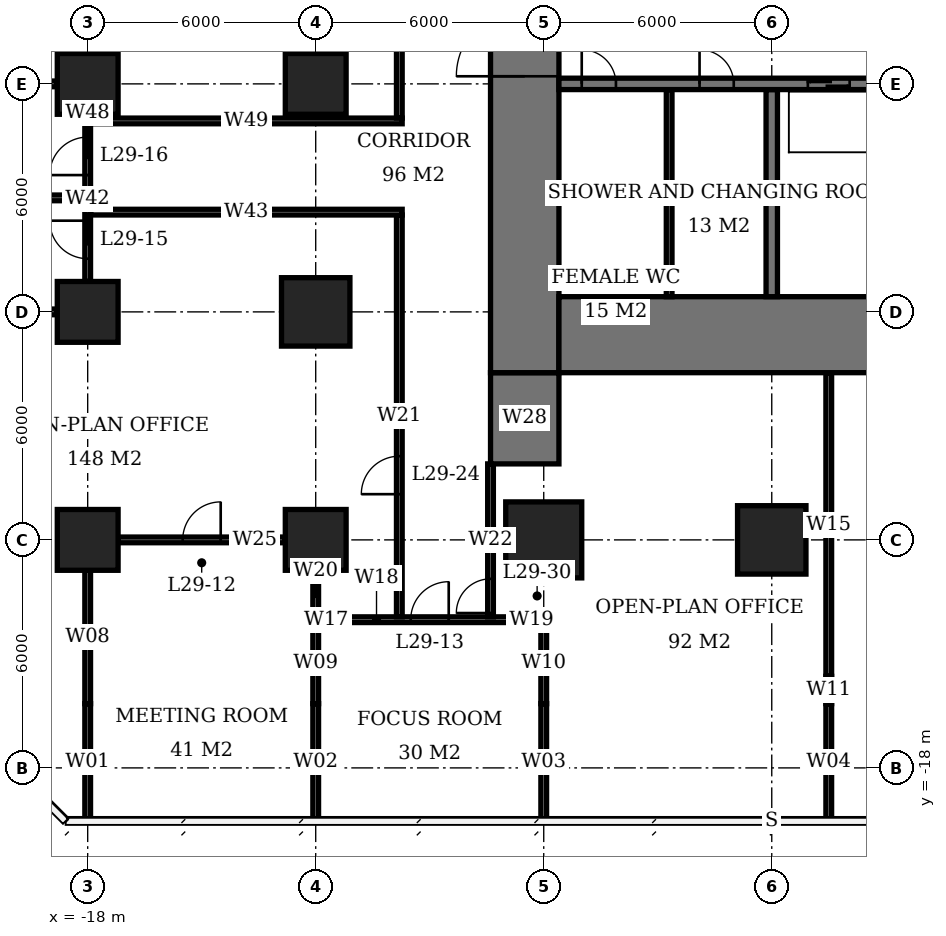
"""IFC4 building model, lengths in metres.
Left out: names, types, materials, properties, quantities, classifications, styles, units other than length and angle.
Written with IfcOpenShell. Run it as: python <this file> out.ifc"""

import sys

from ifc_helpers import new_model, si_unit, direction, frame, frame_2d, origin, origin_2d, place, context, subcontext, project, spatial, rectangle, extrude, element, fill, save


model = new_model("IFC4")
c1 = context("Model", 3, precision=1e-05, world=origin(), true_north=direction((0.0, 1.0)))
c2 = subcontext(c1, "Body", "Model", "MODEL_VIEW")
j1 = project(units=[si_unit("LENGTHUNIT", "METRE"), si_unit("PLANEANGLEUNIT", "RADIAN")], contexts=[c1])
p1 = place(None, origin())
s1 = spatial("IfcSite", under=j1, at=p1, CompositionType="ELEMENT")
p2 = place(p1, origin())
s2 = spatial("IfcBuilding", under=s1, at=p2, CompositionType="ELEMENT")
p3 = place(p2, frame((0.0, 0.0, 121.1)))
s3 = spatial("IfcBuildingStorey", under=s2, at=p3, CompositionType="ELEMENT", Elevation=121.1)
for number, where, z_axis, x_axis in (
    (1, (-18.0, -12.0, 0.0), (0.0, 0.0, 1.0), (1.0, 0.0, 0.0)),
    (2, (-18.0, -6.0, 0.0), (0.0, 0.0, 1.0), (1.0, 0.0, 0.0)),
    (3, (-18.0, 0.0, 0.0), (0.0, 0.0, 1.0), (1.0, 0.0, 0.0)),
    (4, (-12.0, -12.0, 0.0), (0.0, 0.0, 1.0), (1.0, 0.0, 0.0)),
):
    element("IfcColumn", number, at=place(p3, frame(where, z_axis=z_axis, x_axis=x_axis)), inside=s3, PredefinedType="COLUMN", context=c2, shape_type="SweptSolid", body=[
        extrude(rectangle(XDim=1.6, YDim=1.6, at=origin_2d()), origin(), (0.0, 0.0, 1.0), 3.9),
    ])
p4 = place(p3, frame((-12.0, -6.0, 0.0), z_axis=(0.0, 0.0, 1.0), x_axis=(1.0, 0.0, 0.0)))
e5 = element("IfcColumn", 5, at=p4, inside=s3, PredefinedType="COLUMN", context=c2, shape_type="SweptSolid", body=[
    extrude(rectangle(XDim=1.8, YDim=1.8, at=origin_2d()), origin(), (0.0, 0.0, 1.0), 3.9),
])
p5 = place(p3, frame((-12.0, 0.0, 0.0), z_axis=(0.0, 0.0, 1.0), x_axis=(1.0, 0.0, 0.0)))
e6 = element("IfcColumn", 6, at=p5, inside=s3, PredefinedType="COLUMN", context=c2, shape_type="SweptSolid", body=[
    extrude(rectangle(XDim=1.6, YDim=1.6, at=origin_2d()), origin(), (0.0, 0.0, 1.0), 3.9),
])
p6 = place(p3, frame((-6.0, -12.0, 0.0), z_axis=(0.0, 0.0, 1.0), x_axis=(1.0, 0.0, 0.0)))
e7 = element("IfcColumn", 7, at=p6, inside=s3, PredefinedType="COLUMN", context=c2, shape_type="SweptSolid", body=[
    extrude(rectangle(XDim=2.0, YDim=2.0, at=origin_2d()), origin(), (0.0, 0.0, 1.0), 3.9),
])
p7 = place(p3, frame((0.0, -12.0, 0.0), z_axis=(0.0, 0.0, 1.0), x_axis=(1.0, 0.0, 0.0)))
e8 = element("IfcColumn", 8, at=p7, inside=s3, PredefinedType="COLUMN", context=c2, shape_type="SweptSolid", body=[
    extrude(rectangle(XDim=1.8, YDim=1.8, at=origin_2d()), origin(), (0.0, 0.0, 1.0), 3.9),
])
p8 = place(p3, frame((-5.6, -6.6, 0.0), z_axis=(0.0, 0.0, 1.0), x_axis=(1.0, 0.0, 0.0)))
e9 = element("IfcWall", 9, at=p8, inside=s3, PredefinedType="SHEAR", context=c2, shape_type="SweptSolid", body=[
    extrude(rectangle(XDim=23.2, YDim=2.0, at=frame_2d((11.6, 0.0))), origin(), (0.0, 0.0, 1.0), 3.9),
])
p9 = place(p3, frame((-6.5, -7.6, 0.0), z_axis=(0.0, 0.0, 1.0), x_axis=(0.0, 1.0, 0.0)))
e10 = element("IfcWall", 10, at=p9, inside=s3, PredefinedType="SHEAR", context=c2, shape_type="SweptSolid", body=[
    extrude(rectangle(XDim=21.2, YDim=1.8, at=frame_2d((10.6, 0.0))), origin(), (0.0, 0.0, 1.0), 3.9),
])
p10 = place(p9, frame((7.8, 0.0, 0.0)))
e11 = element("IfcOpeningElement", 11, at=p10, cuts=e10, PredefinedType="OPENING", context=c2, shape_type="SweptSolid", body=[
    extrude(rectangle(XDim=1.8, YDim=2.4, at=frame_2d((0.9, 1.2))), frame((0.0, 0.91, 0.0), z_axis=(0.0, -1.0, 0.0), x_axis=(1.0, 0.0, 0.0)), (0.0, 0.0, 1.0), 1.82),
])
p11 = place(p3, frame((-6.5, -10.0, 0.0), z_axis=(0.0, 0.0, 1.0), x_axis=(0.0, 1.0, 0.0)))
e12 = element("IfcWall", 12, at=p11, inside=s3, PredefinedType="SHEAR", context=c2, shape_type="SweptSolid", body=[
    extrude(rectangle(XDim=2.4, YDim=1.8, at=frame_2d((1.2, 0.0))), origin(), (0.0, 0.0, 1.0), 3.9),
])
p12 = place(p3, frame((-5.6, 0.0, 0.0), z_axis=(0.0, 0.0, 1.0), x_axis=(1.0, 0.0, 0.0)))
e13 = element("IfcWall", 13, at=p12, inside=s3, PredefinedType="SHEAR", context=c2, shape_type="SweptSolid", body=[
    extrude(rectangle(XDim=17.75, YDim=0.3, at=frame_2d((8.875, 0.0))), origin(), (0.0, 0.0, 1.0), 3.9),
])
p13 = place(p12, frame((0.6, 0.0, 0.0)))
e14 = element("IfcOpeningElement", 14, at=p13, cuts=e13, PredefinedType="OPENING", context=c2, shape_type="SweptSolid", body=[
    extrude(rectangle(XDim=0.9, YDim=2.1, at=frame_2d((0.45, 1.05))), frame((0.0, 0.16, 0.0), z_axis=(0.0, -1.0, 0.0), x_axis=(1.0, 0.0, 0.0)), (0.0, 0.0, 1.0), 0.32),
])
p14 = place(p12, frame((3.7, 0.0, 0.0)))
e15 = element("IfcOpeningElement", 15, at=p14, cuts=e13, PredefinedType="OPENING", context=c2, shape_type="SweptSolid", body=[
    extrude(rectangle(XDim=0.9, YDim=2.1, at=frame_2d((0.45, 1.05))), frame((0.0, 0.16, 0.0), z_axis=(0.0, -1.0, 0.0), x_axis=(1.0, 0.0, 0.0)), (0.0, 0.0, 1.0), 0.32),
])
p15 = place(p12, frame((6.55, 0.0, 0.0)))
e16 = element("IfcOpeningElement", 16, at=p15, cuts=e13, PredefinedType="OPENING", context=c2, shape_type="SweptSolid", body=[
    extrude(rectangle(XDim=1.1, YDim=2.1, at=frame_2d((0.55, 1.05))), frame((0.0, 0.16, 0.0), z_axis=(0.0, -1.0, 0.0), x_axis=(1.0, 0.0, 0.0)), (0.0, 0.0, 1.0), 0.32),
])
p16 = place(p12, frame((9.55, 0.0, 0.0)))
e17 = element("IfcOpeningElement", 17, at=p16, cuts=e13, PredefinedType="OPENING", context=c2, shape_type="SweptSolid", body=[
    extrude(rectangle(XDim=1.1, YDim=2.1, at=frame_2d((0.55, 1.05))), frame((0.0, 0.16, 0.0), z_axis=(0.0, -1.0, 0.0), x_axis=(1.0, 0.0, 0.0)), (0.0, 0.0, 1.0), 0.32),
])
p17 = place(p3, frame((0.0, -5.6, 0.0), z_axis=(0.0, 0.0, 1.0), x_axis=(0.0, 1.0, 0.0)))
e18 = element("IfcWall", 18, at=p17, inside=s3, PredefinedType="SHEAR", context=c2, shape_type="SweptSolid", body=[
    extrude(rectangle(XDim=5.45, YDim=0.3, at=frame_2d((2.725, 0.0))), origin(), (0.0, 0.0, 1.0), 3.9),
])
p18 = place(p3, frame((-2.7, -5.6, 0.0), z_axis=(0.0, 0.0, 1.0), x_axis=(0.0, 1.0, 0.0)))
e19 = element("IfcWall", 19, at=p18, inside=s3, PredefinedType="PLUMBINGWALL", context=c2, shape_type="SweptSolid", body=[
    extrude(rectangle(XDim=5.45, YDim=0.15, at=frame_2d((2.725, 0.0))), origin(), (0.0, 0.0, 1.0), 3.65),
])
p19 = place(p3, frame((-12.15, -14.1, 0.0), z_axis=(0.0, 0.0, 1.0), x_axis=(1.0, 0.0, 0.0)))
e20 = element("IfcWall", 20, at=p19, inside=s3, PredefinedType="PARTITIONING", context=c2, shape_type="SweptSolid", body=[
    extrude(rectangle(XDim=0.86, YDim=0.15, at=frame_2d((0.43, 0.0))), origin(), (0.0, 0.0, 1.0), 2.65),
])
p20 = place(p3, frame((-11.29, -14.1, 0.0), z_axis=(0.0, 0.0, 1.0), x_axis=(1.0, 0.0, 0.0)))
e21 = element("IfcWall", 21, at=p20, inside=s3, PredefinedType="PARTITIONING", context=c2, shape_type="SweptSolid", body=[
    extrude(rectangle(XDim=4.58, YDim=0.15, at=frame_2d((2.29, 0.0))), origin(), (0.0, 0.0, 1.0), 3.65),
])
p21 = place(p20, frame((1.79, 0.0, 0.0)))
e22 = element("IfcOpeningElement", 22, at=p21, cuts=e21, PredefinedType="OPENING", context=c2, shape_type="SweptSolid", body=[
    extrude(rectangle(XDim=1.0, YDim=2.1, at=frame_2d((0.5, 1.05))), frame((0.0, 0.085, 0.0), z_axis=(0.0, -1.0, 0.0), x_axis=(1.0, 0.0, 0.0)), (0.0, 0.0, 1.0), 0.17),
])
p22 = place(p3, frame((-6.71, -14.1, 0.0), z_axis=(0.0, 0.0, 1.0), x_axis=(1.0, 0.0, 0.0)))
e23 = element("IfcWall", 23, at=p22, inside=s3, PredefinedType="PARTITIONING", context=c2, shape_type="SweptSolid", body=[
    extrude(rectangle(XDim=0.785, YDim=0.15, at=frame_2d((0.393, 0.0))), origin(), (0.0, 0.0, 1.0), 2.65),
])
p23 = place(p3, frame((-17.2, -12.0, 0.0), z_axis=(0.0, 0.0, 1.0), x_axis=(1.0, 0.0, 0.0)))
e24 = element("IfcWall", 24, at=p23, inside=s3, PredefinedType="PARTITIONING", context=c2, shape_type="SweptSolid", body=[
    extrude(rectangle(XDim=4.4, YDim=0.15, at=frame_2d((2.2, 0.0))), origin(), (0.0, 0.0, 1.0), 3.65),
])
p24 = place(p23, frame((1.7, 0.0, 0.0)))
e25 = element("IfcOpeningElement", 25, at=p24, cuts=e24, PredefinedType="OPENING", context=c2, shape_type="SweptSolid", body=[
    extrude(rectangle(XDim=1.0, YDim=2.1, at=frame_2d((0.5, 1.05))), frame((0.0, 0.085, 0.0), z_axis=(0.0, -1.0, 0.0), x_axis=(1.0, 0.0, 0.0)), (0.0, 0.0, 1.0), 0.17),
])
p25 = place(p3, frame((-22.31, -6.0, 0.0), z_axis=(0.0, 0.0, 1.0), x_axis=(1.0, 0.0, 0.0)))
e26 = element("IfcWall", 26, at=p25, inside=s3, PredefinedType="PARTITIONING", context=c2, shape_type="SweptSolid", body=[
    extrude(rectangle(XDim=3.51, YDim=0.15, at=frame_2d((1.755, 0.0))), origin(), (0.0, 0.0, 1.0), 2.65),
])
p26 = place(p3, frame((-21.59, -3.0, 0.0), z_axis=(0.0, 0.0, 1.0), x_axis=(1.0, 0.0, 0.0)))
e27 = element("IfcWall", 27, at=p26, inside=s3, PredefinedType="PARTITIONING", context=c2, shape_type="SweptSolid", body=[
    extrude(rectangle(XDim=3.74, YDim=0.15, at=frame_2d((1.87, 0.0))), origin(), (0.0, 0.0, 1.0), 3.65),
])
p27 = place(p3, frame((-22.31, 0.0, 0.0), z_axis=(0.0, 0.0, 1.0), x_axis=(1.0, 0.0, 0.0)))
e28 = element("IfcWall", 28, at=p27, inside=s3, PredefinedType="PARTITIONING", context=c2, shape_type="SweptSolid", body=[
    extrude(rectangle(XDim=3.51, YDim=0.15, at=frame_2d((1.755, 0.0))), origin(), (0.0, 0.0, 1.0), 2.65),
])
p28 = place(p3, frame((-18.0, -19.4, 0.0), z_axis=(0.0, 0.0, 1.0), x_axis=(0.0, 1.0, 0.0)))
e29 = element("IfcWall", 29, at=p28, inside=s3, PredefinedType="PARTITIONING", context=c2, shape_type="SweptSolid", body=[
    extrude(rectangle(XDim=3.09, YDim=0.15, at=frame_2d((1.545, 0.0))), origin(), (0.0, 0.0, 1.0), 3.65),
])
p29 = place(p3, frame((-18.0, -16.31, 0.0), z_axis=(0.0, 0.0, 1.0), x_axis=(0.0, 1.0, 0.0)))
e30 = element("IfcWall", 30, at=p29, inside=s3, PredefinedType="PARTITIONING", context=c2, shape_type="SweptSolid", body=[
    extrude(rectangle(XDim=3.51, YDim=0.15, at=frame_2d((1.755, 0.0))), origin(), (0.0, 0.0, 1.0), 2.65),
])
p30 = place(p3, frame((-18.0, -5.2, 0.0), z_axis=(0.0, 0.0, 1.0), x_axis=(0.0, 1.0, 0.0)))
e31 = element("IfcWall", 31, at=p30, inside=s3, PredefinedType="PARTITIONING", context=c2, shape_type="SweptSolid", body=[
    extrude(rectangle(XDim=2.125, YDim=0.15, at=frame_2d((1.062, 0.0))), origin(), (0.0, 0.0, 1.0), 3.65),
])
p31 = place(p30, frame((0.6, 0.0, 0.0)))
e32 = element("IfcOpeningElement", 32, at=p31, cuts=e31, PredefinedType="OPENING", context=c2, shape_type="SweptSolid", body=[
    extrude(rectangle(XDim=1.0, YDim=2.1, at=frame_2d((0.5, 1.05))), frame((0.0, 0.085, 0.0), z_axis=(0.0, -1.0, 0.0), x_axis=(1.0, 0.0, 0.0)), (0.0, 0.0, 1.0), 0.17),
])
p32 = place(p3, frame((-18.0, -2.925, 0.0), z_axis=(0.0, 0.0, 1.0), x_axis=(0.0, 1.0, 0.0)))
e33 = element("IfcWall", 33, at=p32, inside=s3, PredefinedType="PARTITIONING", context=c2, shape_type="SweptSolid", body=[
    extrude(rectangle(XDim=2.125, YDim=0.15, at=frame_2d((1.062, 0.0))), origin(), (0.0, 0.0, 1.0), 3.65),
])
p33 = place(p32, frame((0.525, 0.0, 0.0)))
e34 = element("IfcOpeningElement", 34, at=p33, cuts=e33, PredefinedType="OPENING", context=c2, shape_type="SweptSolid", body=[
    extrude(rectangle(XDim=1.0, YDim=2.1, at=frame_2d((0.5, 1.05))), frame((0.0, 0.085, 0.0), z_axis=(0.0, -1.0, 0.0), x_axis=(1.0, 0.0, 0.0)), (0.0, 0.0, 1.0), 0.17),
])
p34 = place(p3, frame((-18.0, 0.8, 0.0), z_axis=(0.0, 0.0, 1.0), x_axis=(0.0, 1.0, 0.0)))
e35 = element("IfcWall", 35, at=p34, inside=s3, PredefinedType="PARTITIONING", context=c2, shape_type="SweptSolid", body=[
    extrude(rectangle(XDim=4.4, YDim=0.15, at=frame_2d((2.2, 0.0))), origin(), (0.0, 0.0, 1.0), 3.65),
])
p35 = place(p34, frame((1.7, 0.0, 0.0)))
e36 = element("IfcOpeningElement", 36, at=p35, cuts=e35, PredefinedType="OPENING", context=c2, shape_type="SweptSolid", body=[
    extrude(rectangle(XDim=1.0, YDim=2.1, at=frame_2d((0.5, 1.05))), frame((0.0, 0.085, 0.0), z_axis=(0.0, -1.0, 0.0), x_axis=(1.0, 0.0, 0.0)), (0.0, 0.0, 1.0), 0.17),
])
p36 = place(p3, frame((-12.0, -19.4, 0.0), z_axis=(0.0, 0.0, 1.0), x_axis=(0.0, 1.0, 0.0)))
e37 = element("IfcWall", 37, at=p36, inside=s3, PredefinedType="PARTITIONING", context=c2, shape_type="SweptSolid", body=[
    extrude(rectangle(XDim=3.09, YDim=0.15, at=frame_2d((1.545, 0.0))), origin(), (0.0, 0.0, 1.0), 3.65),
])
p37 = place(p3, frame((-12.0, -16.31, 0.0), z_axis=(0.0, 0.0, 1.0), x_axis=(0.0, 1.0, 0.0)))
e38 = element("IfcWall", 38, at=p37, inside=s3, PredefinedType="PARTITIONING", context=c2, shape_type="SweptSolid", body=[
    extrude(rectangle(XDim=2.135, YDim=0.15, at=frame_2d((1.067, 0.0))), origin(), (0.0, 0.0, 1.0), 2.65),
])
p38 = place(p3, frame((-12.0, -14.025, 0.0), z_axis=(0.0, 0.0, 1.0), x_axis=(0.0, 1.0, 0.0)))
e39 = element("IfcWall", 39, at=p38, inside=s3, PredefinedType="PARTITIONING", context=c2, shape_type="SweptSolid", body=[
    extrude(rectangle(XDim=1.225, YDim=0.15, at=frame_2d((0.612, 0.0))), origin(), (0.0, 0.0, 1.0), 2.65),
])
p39 = place(p3, frame((-6.0, -19.4, 0.0), z_axis=(0.0, 0.0, 1.0), x_axis=(0.0, 1.0, 0.0)))
e40 = element("IfcWall", 40, at=p39, inside=s3, PredefinedType="PARTITIONING", context=c2, shape_type="SweptSolid", body=[
    extrude(rectangle(XDim=3.09, YDim=0.15, at=frame_2d((1.545, 0.0))), origin(), (0.0, 0.0, 1.0), 3.65),
])
p40 = place(p3, frame((-6.0, -16.31, 0.0), z_axis=(0.0, 0.0, 1.0), x_axis=(0.0, 1.0, 0.0)))
e41 = element("IfcWall", 41, at=p40, inside=s3, PredefinedType="PARTITIONING", context=c2, shape_type="SweptSolid", body=[
    extrude(rectangle(XDim=2.135, YDim=0.15, at=frame_2d((1.067, 0.0))), origin(), (0.0, 0.0, 1.0), 2.65),
])
for number, where, z_axis, x_axis in (
    (42, (-17.925, -3.375, 0.0), (0.0, 0.0, 1.0), (1.0, 0.0, 0.0)),
    (43, (-17.925, -0.975, 0.0), (0.0, 0.0, 1.0), (1.0, 0.0, 0.0)),
):
    element("IfcWall", number, at=place(p3, frame(where, z_axis=z_axis, x_axis=x_axis)), inside=s3, PredefinedType="PARTITIONING", context=c2, shape_type="SweptSolid", body=[
        extrude(rectangle(XDim=8.2, YDim=0.15, at=frame_2d((4.1, 0.0))), origin(), (0.0, 0.0, 1.0), 3.65),
    ])
p41 = place(p3, frame((-9.8, -14.025, 0.0), z_axis=(0.0, 0.0, 1.0), x_axis=(0.0, 1.0, 0.0)))
e44 = element("IfcWall", 44, at=p41, inside=s3, PredefinedType="PARTITIONING", context=c2, shape_type="SweptSolid", body=[
    extrude(rectangle(XDim=10.575, YDim=0.15, at=frame_2d((5.288, 0.0))), origin(), (0.0, 0.0, 1.0), 3.65),
])
p42 = place(p41, frame((3.228, 0.0, 0.0)))
e45 = element("IfcOpeningElement", 45, at=p42, cuts=e44, PredefinedType="OPENING", context=c2, shape_type="SweptSolid", body=[
    extrude(rectangle(XDim=1.0, YDim=2.1, at=frame_2d((0.5, 1.05))), frame((0.0, 0.085, 0.0), z_axis=(0.0, -1.0, 0.0), x_axis=(1.0, 0.0, 0.0)), (0.0, 0.0, 1.0), 0.17),
])
p43 = place(p3, frame((-9.8, -0.9, 0.0), z_axis=(0.0, 0.0, 1.0), x_axis=(0.0, 1.0, 0.0)))
e46 = element("IfcWall", 46, at=p43, inside=s3, PredefinedType="PARTITIONING", context=c2, shape_type="SweptSolid", body=[
    extrude(rectangle(XDim=11.325, YDim=0.15, at=frame_2d((5.663, 0.0))), origin(), (0.0, 0.0, 1.0), 3.65),
])
p44 = place(p43, frame((3.441, 0.0, 0.0)))
e47 = element("IfcOpeningElement", 47, at=p44, cuts=e46, PredefinedType="OPENING", context=c2, shape_type="SweptSolid", body=[
    extrude(rectangle(XDim=1.0, YDim=2.1, at=frame_2d((0.5, 1.05))), frame((0.0, 0.085, 0.0), z_axis=(0.0, -1.0, 0.0), x_axis=(1.0, 0.0, 0.0)), (0.0, 0.0, 1.0), 0.17),
])
p45 = place(p3, frame((-7.4, -14.025, 0.0), z_axis=(0.0, 0.0, 1.0), x_axis=(0.0, 1.0, 0.0)))
e48 = element("IfcWall", 48, at=p45, inside=s3, PredefinedType="PARTITIONING", context=c2, shape_type="SweptSolid", body=[
    extrude(rectangle(XDim=4.025, YDim=0.15, at=frame_2d((2.012, 0.0))), origin(), (0.0, 0.0, 1.0), 3.65),
])
p46 = place(p45, frame((0.1, 0.0, 0.0)))
e49 = element("IfcOpeningElement", 49, at=p46, cuts=e48, PredefinedType="OPENING", context=c2, shape_type="SweptSolid", body=[
    extrude(rectangle(XDim=0.9, YDim=2.1, at=frame_2d((0.45, 1.05))), frame((0.0, 0.085, 0.0), z_axis=(0.0, -1.0, 0.0), x_axis=(1.0, 0.0, 0.0)), (0.0, 0.0, 1.0), 0.17),
])
p47 = place(p3, frame((1.5, -19.4, 0.0), z_axis=(0.0, 0.0, 1.0), x_axis=(0.0, 1.0, 0.0)))
e50 = element("IfcWall", 50, at=p47, inside=s3, PredefinedType="PARTITIONING", context=c2, shape_type="SweptSolid", body=[
    extrude(rectangle(XDim=3.09, YDim=0.15, at=frame_2d((1.545, 0.0))), origin(), (0.0, 0.0, 1.0), 3.65),
])
p48 = place(p3, frame((1.5, -16.31, 0.0), z_axis=(0.0, 0.0, 1.0), x_axis=(0.0, 1.0, 0.0)))
e51 = element("IfcWall", 51, at=p48, inside=s3, PredefinedType="PARTITIONING", context=c2, shape_type="SweptSolid", body=[
    extrude(rectangle(XDim=0.72, YDim=0.15, at=frame_2d((0.36, 0.0))), origin(), (0.0, 0.0, 1.0), 2.65),
])
p49 = place(p3, frame((1.5, -15.59, 0.0), z_axis=(0.0, 0.0, 1.0), x_axis=(0.0, 1.0, 0.0)))
e52 = element("IfcWall", 52, at=p49, inside=s3, PredefinedType="PARTITIONING", context=c2, shape_type="SweptSolid", body=[
    extrude(rectangle(XDim=7.99, YDim=0.15, at=frame_2d((3.995, 0.0))), origin(), (0.0, 0.0, 1.0), 3.65),
])
p50 = place(p10, origin())
e53 = element("IfcDoor", 53, at=p50, inside=s3, OperationType="DOUBLE_DOOR_SINGLE_SWING", PredefinedType="DOOR", context=c2, shape_type="SweptSolid", body=[
    extrude(rectangle(XDim=1.8, YDim=2.4, at=frame_2d((0.9, 1.2))), frame((0.0, 0.025, 0.0), z_axis=(0.0, -1.0, 0.0), x_axis=(1.0, 0.0, 0.0)), (0.0, 0.0, 1.0), 0.05),
])
fill(e11, e53)
p51 = place(p13, origin())
e54 = element("IfcDoor", 54, at=p51, inside=s3, OperationType="SINGLE_SWING_LEFT", PredefinedType="DOOR", context=c2, shape_type="SweptSolid", body=[
    extrude(rectangle(XDim=0.9, YDim=2.1, at=frame_2d((0.45, 1.05))), frame((0.0, 0.025, 0.0), z_axis=(0.0, -1.0, 0.0), x_axis=(1.0, 0.0, 0.0)), (0.0, 0.0, 1.0), 0.05),
])
fill(e14, e54)
p52 = place(p14, origin())
e55 = element("IfcDoor", 55, at=p52, inside=s3, OperationType="SINGLE_SWING_LEFT", PredefinedType="DOOR", context=c2, shape_type="SweptSolid", body=[
    extrude(rectangle(XDim=0.9, YDim=2.1, at=frame_2d((0.45, 1.05))), frame((0.0, 0.025, 0.0), z_axis=(0.0, -1.0, 0.0), x_axis=(1.0, 0.0, 0.0)), (0.0, 0.0, 1.0), 0.05),
])
fill(e15, e55)
p53 = place(p15, origin())
e56 = element("IfcDoor", 56, at=p53, inside=s3, OperationType="DOUBLE_DOOR_SLIDING", PredefinedType="USERDEFINED", context=c2, shape_type="SweptSolid", body=[
    extrude(rectangle(XDim=1.1, YDim=2.1, at=frame_2d((0.55, 1.05))), frame((0.0, 0.025, 0.0), z_axis=(0.0, -1.0, 0.0), x_axis=(1.0, 0.0, 0.0)), (0.0, 0.0, 1.0), 0.05),
])
fill(e16, e56)
p54 = place(p24, origin())
e57 = element("IfcDoor", 57, at=p54, inside=s3, OperationType="SINGLE_SWING_RIGHT", PredefinedType="DOOR", context=c2, shape_type="SweptSolid", body=[
    extrude(rectangle(XDim=1.0, YDim=2.1, at=frame_2d((0.5, 1.05))), frame((0.0, 0.025, 0.0), z_axis=(0.0, -1.0, 0.0), x_axis=(1.0, 0.0, 0.0)), (0.0, 0.0, 1.0), 0.05),
])
fill(e25, e57)
p55 = place(p21, origin())
e58 = element("IfcDoor", 58, at=p55, inside=s3, OperationType="SINGLE_SWING_RIGHT", PredefinedType="DOOR", context=c2, shape_type="SweptSolid", body=[
    extrude(rectangle(XDim=1.0, YDim=2.1, at=frame_2d((0.5, 1.05))), frame((0.0, 0.025, 0.0), z_axis=(0.0, -1.0, 0.0), x_axis=(1.0, 0.0, 0.0)), (0.0, 0.0, 1.0), 0.05),
])
fill(e22, e58)
p56 = place(p31, origin())
e59 = element("IfcDoor", 59, at=p56, inside=s3, OperationType="SINGLE_SWING_RIGHT", PredefinedType="DOOR", context=c2, shape_type="SweptSolid", body=[
    extrude(rectangle(XDim=1.0, YDim=2.1, at=frame_2d((0.5, 1.05))), frame((0.0, 0.025, 0.0), z_axis=(0.0, -1.0, 0.0), x_axis=(1.0, 0.0, 0.0)), (0.0, 0.0, 1.0), 0.05),
])
fill(e32, e59)
p57 = place(p33, origin())
e60 = element("IfcDoor", 60, at=p57, inside=s3, OperationType="SINGLE_SWING_LEFT", PredefinedType="DOOR", context=c2, shape_type="SweptSolid", body=[
    extrude(rectangle(XDim=1.0, YDim=2.1, at=frame_2d((0.5, 1.05))), frame((0.0, 0.025, 0.0), z_axis=(0.0, -1.0, 0.0), x_axis=(1.0, 0.0, 0.0)), (0.0, 0.0, 1.0), 0.05),
])
fill(e34, e60)
p58 = place(p42, origin())
e61 = element("IfcDoor", 61, at=p58, inside=s3, OperationType="SINGLE_SWING_LEFT", PredefinedType="DOOR", context=c2, shape_type="SweptSolid", body=[
    extrude(rectangle(XDim=1.0, YDim=2.1, at=frame_2d((0.5, 1.05))), frame((0.0, 0.025, 0.0), z_axis=(0.0, -1.0, 0.0), x_axis=(1.0, 0.0, 0.0)), (0.0, 0.0, 1.0), 0.05),
])
fill(e45, e61)
p59 = place(p46, origin())
e62 = element("IfcDoor", 62, at=p59, inside=s3, OperationType="SINGLE_SWING_LEFT", PredefinedType="DOOR", context=c2, shape_type="SweptSolid", body=[
    extrude(rectangle(XDim=0.9, YDim=2.1, at=frame_2d((0.45, 1.05))), frame((0.0, 0.025, 0.0), z_axis=(0.0, -1.0, 0.0), x_axis=(1.0, 0.0, 0.0)), (0.0, 0.0, 1.0), 0.05),
])
fill(e49, e62)
save(model, sys.argv[1])
